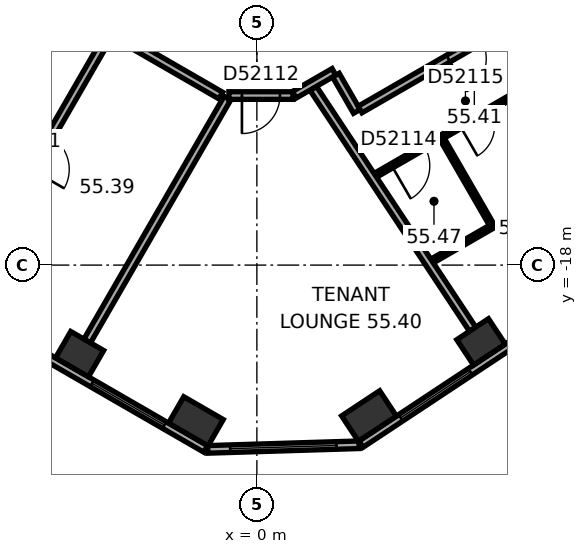
"""IFC4 building model, lengths in metres.
Left out: names, types, materials, properties, quantities, classifications, styles, units other than length and angle.
Written with IfcOpenShell. Run it as: python <this file> out.ifc"""

import sys

from ifc_helpers import new_model, si_unit, direction, frame, frame_2d, origin, origin_2d, place, context, subcontext, project, spatial, rectangle, extrude, element, fill, save


model = new_model("IFC4")
c1 = context("Model", 3, precision=1e-05, world=origin(), true_north=direction((0.0, 1.0)))
c2 = subcontext(c1, "Body", "Model", "MODEL_VIEW")
j1 = project(units=[si_unit("LENGTHUNIT", "METRE"), si_unit("PLANEANGLEUNIT", "RADIAN")], contexts=[c1])
p1 = place(None, origin())
s1 = spatial("IfcSite", under=j1, at=p1, CompositionType="ELEMENT")
p2 = place(p1, origin())
s2 = spatial("IfcBuilding", under=s1, at=p2, CompositionType="ELEMENT")
p3 = place(p2, frame((0.0, 0.0, 225.4)))
s3 = spatial("IfcBuildingStorey", under=s2, at=p3, CompositionType="ELEMENT", Elevation=225.4)
p4 = place(p3, frame((-4.665, -20.343, 0.0), z_axis=(0.0, 0.0, 1.0), x_axis=(0.866025403784, -0.5, 0.0)))
e1 = element("IfcColumn", 1, at=p4, inside=s3, PredefinedType="COLUMN", context=c2, shape_type="SweptSolid", body=[
    extrude(rectangle(XDim=1.0, YDim=0.8, at=origin_2d()), origin(), (0.0, 0.0, 1.0), 3.7),
])
for number, where, z_axis, x_axis in (
    (2, (-1.604, -22.11, 0.0), (0.0, 0.0, 1.0), (0.866, -0.5, 0.0)),
    (3, (2.951, -21.971, 0.0), (0.0, 0.0, 1.0), (0.834, 0.552, 0.0)),
):
    element("IfcColumn", number, at=place(p3, frame(where, z_axis=z_axis, x_axis=x_axis)), inside=s3, PredefinedType="COLUMN", context=c2, shape_type="SweptSolid", body=[
        extrude(rectangle(XDim=1.2, YDim=0.8, at=origin_2d()), origin(), (0.0, 0.0, 1.0), 3.7),
    ])
p5 = place(p3, frame((5.898, -20.021, 0.0), z_axis=(0.0, 0.0, 1.0), x_axis=(0.833885822067, 0.551936985312, 0.0)))
e4 = element("IfcColumn", 4, at=p5, inside=s3, PredefinedType="COLUMN", context=c2, shape_type="SweptSolid", body=[
    extrude(rectangle(XDim=1.0, YDim=0.8, at=origin_2d()), origin(), (0.0, 0.0, 1.0), 3.7),
])
p6 = place(p3, frame((-17.664, -13.415, 0.0), z_axis=(0.0, 0.0, 1.0), x_axis=(0.866026555358, -0.49999800541, 0.0)))
e5 = element("IfcWall", 5, at=p6, inside=s3, PredefinedType="STANDARD", context=c2, shape_type="SweptSolid", body=[
    extrude(rectangle(XDim=18.841, YDim=0.2, at=frame_2d((9.421, 0.0))), origin(), (0.0, 0.0, 1.0), 3.7),
])
p7 = place(p6, frame((1.254, 0.0, 0.9)))
e6 = element("IfcOpeningElement", 6, at=p7, cuts=e5, PredefinedType="OPENING", context=c2, shape_type="SweptSolid", body=[
    extrude(rectangle(XDim=2.2, YDim=2.0, at=frame_2d((1.1, 1.0))), frame((0.0, 0.11, 0.0), z_axis=(0.0, -1.0, 0.0), x_axis=(1.0, 0.0, 0.0)), (0.0, 0.0, 1.0), 0.22),
])
p8 = place(p6, frame((4.788, 0.0, 0.9)))
e7 = element("IfcOpeningElement", 7, at=p8, cuts=e5, PredefinedType="OPENING", context=c2, shape_type="SweptSolid", body=[
    extrude(rectangle(XDim=2.2, YDim=2.0, at=frame_2d((1.1, 1.0))), frame((0.0, 0.11, 0.0), z_axis=(0.0, -1.0, 0.0), x_axis=(1.0, 0.0, 0.0)), (0.0, 0.0, 1.0), 0.22),
])
p9 = place(p6, frame((8.322, 0.0, 0.9)))
e8 = element("IfcOpeningElement", 8, at=p9, cuts=e5, PredefinedType="OPENING", context=c2, shape_type="SweptSolid", body=[
    extrude(rectangle(XDim=2.2, YDim=2.0, at=frame_2d((1.1, 1.0))), frame((0.0, 0.11, 0.0), z_axis=(0.0, -1.0, 0.0), x_axis=(1.0, 0.0, 0.0)), (0.0, 0.0, 1.0), 0.22),
])
p10 = place(p6, frame((11.855, 0.0, 0.9)))
e9 = element("IfcOpeningElement", 9, at=p10, cuts=e5, PredefinedType="OPENING", context=c2, shape_type="SweptSolid", body=[
    extrude(rectangle(XDim=2.2, YDim=2.0, at=frame_2d((1.1, 1.0))), frame((0.0, 0.11, 0.0), z_axis=(0.0, -1.0, 0.0), x_axis=(1.0, 0.0, 0.0)), (0.0, 0.0, 1.0), 0.22),
])
p11 = place(p6, frame((15.389, 0.0, 0.9)))
e10 = element("IfcOpeningElement", 10, at=p11, cuts=e5, PredefinedType="OPENING", context=c2, shape_type="SweptSolid", body=[
    extrude(rectangle(XDim=2.2, YDim=2.0, at=frame_2d((1.1, 1.0))), frame((0.0, 0.11, 0.0), z_axis=(0.0, -1.0, 0.0), x_axis=(1.0, 0.0, 0.0)), (0.0, 0.0, 1.0), 0.22),
])
p12 = place(p3, frame((-1.294, -22.849, 0.0), z_axis=(0.0, 0.0, 1.0), x_axis=(0.999533952558, 0.030526671678, 0.0)))
e11 = element("IfcWall", 11, at=p12, inside=s3, PredefinedType="STANDARD", context=c2, shape_type="SweptSolid", body=[
    extrude(rectangle(XDim=3.983, YDim=0.2, at=frame_2d((1.991, 0.0))), origin(), (0.0, 0.0, 1.0), 3.7),
])
p13 = place(p12, frame((0.591, 0.0, 0.9)))
e12 = element("IfcOpeningElement", 12, at=p13, cuts=e11, PredefinedType="OPENING", context=c2, shape_type="SweptSolid", body=[
    extrude(rectangle(XDim=2.8, YDim=2.0, at=frame_2d((1.4, 1.0))), frame((0.0, 0.11, 0.0), z_axis=(0.0, -1.0, 0.0), x_axis=(1.0, 0.0, 0.0)), (0.0, 0.0, 1.0), 0.22),
])
p14 = place(p3, frame((2.739, -22.711, 0.0), z_axis=(0.0, 0.0, 1.0), x_axis=(0.833885723098, 0.551937134838, 0.0)))
e13 = element("IfcWall", 13, at=p14, inside=s3, PredefinedType="STANDARD", context=c2, shape_type="SweptSolid", body=[
    extrude(rectangle(XDim=18.841, YDim=0.2, at=frame_2d((9.421, 0.0))), origin(), (0.0, 0.0, 1.0), 3.7),
])
p15 = place(p14, frame((1.252, 0.0, 0.9)))
e14 = element("IfcOpeningElement", 14, at=p15, cuts=e13, PredefinedType="OPENING", context=c2, shape_type="SweptSolid", body=[
    extrude(rectangle(XDim=2.2, YDim=2.0, at=frame_2d((1.1, 1.0))), frame((0.0, 0.11, 0.0), z_axis=(0.0, -1.0, 0.0), x_axis=(1.0, 0.0, 0.0)), (0.0, 0.0, 1.0), 0.22),
])
p16 = place(p14, frame((4.786, 0.0, 0.9)))
e15 = element("IfcOpeningElement", 15, at=p16, cuts=e13, PredefinedType="OPENING", context=c2, shape_type="SweptSolid", body=[
    extrude(rectangle(XDim=2.2, YDim=2.0, at=frame_2d((1.1, 1.0))), frame((0.0, 0.11, 0.0), z_axis=(0.0, -1.0, 0.0), x_axis=(1.0, 0.0, 0.0)), (0.0, 0.0, 1.0), 0.22),
])
p17 = place(p14, frame((8.32, 0.0, 0.9)))
e16 = element("IfcOpeningElement", 16, at=p17, cuts=e13, PredefinedType="OPENING", context=c2, shape_type="SweptSolid", body=[
    extrude(rectangle(XDim=2.2, YDim=2.0, at=frame_2d((1.1, 1.0))), frame((0.0, 0.11, 0.0), z_axis=(0.0, -1.0, 0.0), x_axis=(1.0, 0.0, 0.0)), (0.0, 0.0, 1.0), 0.22),
])
p18 = place(p14, frame((11.854, 0.0, 0.9)))
e17 = element("IfcOpeningElement", 17, at=p18, cuts=e13, PredefinedType="OPENING", context=c2, shape_type="SweptSolid", body=[
    extrude(rectangle(XDim=2.2, YDim=2.0, at=frame_2d((1.1, 1.0))), frame((0.0, 0.11, 0.0), z_axis=(0.0, -1.0, 0.0), x_axis=(1.0, 0.0, 0.0)), (0.0, 0.0, 1.0), 0.22),
])
p19 = place(p14, frame((15.387, 0.0, 0.9)))
e18 = element("IfcOpeningElement", 18, at=p19, cuts=e13, PredefinedType="OPENING", context=c2, shape_type="SweptSolid", body=[
    extrude(rectangle(XDim=2.2, YDim=2.0, at=frame_2d((1.1, 1.0))), frame((0.0, 0.11, 0.0), z_axis=(0.0, -1.0, 0.0), x_axis=(1.0, 0.0, 0.0)), (0.0, 0.0, 1.0), 0.22),
])
p20 = place(p3, frame((-7.525, -18.23, 0.0), z_axis=(0.0, 0.0, 1.0), x_axis=(0.499983153418, 0.866035129944, 0.0)))
e19 = element("IfcWall", 19, at=p20, inside=s3, PredefinedType="PARTITIONING", context=c2, shape_type="SweptSolid", body=[
    extrude(rectangle(XDim=7.35, YDim=0.2, at=frame_2d((3.675, 0.0))), origin(), (0.0, 0.0, 1.0), 3.42),
])
p21 = place(p20, frame((3.175, 0.0, 0.0)))
e20 = element("IfcOpeningElement", 20, at=p21, cuts=e19, PredefinedType="OPENING", context=c2, shape_type="SweptSolid", body=[
    extrude(rectangle(XDim=1.0, YDim=2.1, at=frame_2d((0.5, 1.05))), frame((0.0, 0.11, 0.0), z_axis=(0.0, -1.0, 0.0), x_axis=(1.0, 0.0, 0.0)), (0.0, 0.0, 1.0), 0.22),
])
p22 = place(p3, frame((-4.465, -19.997, 0.0), z_axis=(0.0, 0.0, 1.0), x_axis=(0.500011802906, 0.866018589266, 0.0)))
e21 = element("IfcWall", 21, at=p22, inside=s3, PredefinedType="PARTITIONING", context=c2, shape_type="SweptSolid", body=[
    extrude(rectangle(XDim=7.377, YDim=0.2, at=frame_2d((3.688, 0.0))), origin(), (0.0, 0.0, 1.0), 3.42),
])
p23 = place(p3, frame((-3.763, -11.915, 0.0), z_axis=(0.0, 0.0, 1.0), x_axis=(0.866037915695, -0.499978328108, 0.0)))
e22 = element("IfcWall", 22, at=p23, inside=s3, PredefinedType="PARTITIONING", context=c2, shape_type="SweptSolid", body=[
    extrude(rectangle(XDim=3.249, YDim=0.2, at=frame_2d((1.625, 0.0))), origin(), (0.0, 0.0, 1.0), 3.42),
])
p24 = place(p3, frame((-0.736, -13.539, 0.0), z_axis=(0.0, 0.0, 1.0), x_axis=(1.0, 0.0, 0.0)))
e23 = element("IfcWall", 23, at=p24, inside=s3, PredefinedType="PARTITIONING", context=c2, shape_type="SweptSolid", body=[
    extrude(rectangle(XDim=1.686, YDim=0.2, at=frame_2d((0.843, 0.0))), origin(), (0.0, 0.0, 1.0), 3.42),
])
p25 = place(p24, frame((0.343, 0.0, 0.0)))
e24 = element("IfcOpeningElement", 24, at=p25, cuts=e23, PredefinedType="OPENING", context=c2, shape_type="SweptSolid", body=[
    extrude(rectangle(XDim=1.0, YDim=2.1, at=frame_2d((0.5, 1.05))), frame((0.0, 0.11, 0.0), z_axis=(0.0, -1.0, 0.0), x_axis=(1.0, 0.0, 0.0)), (0.0, 0.0, 1.0), 0.22),
])
p26 = place(p3, frame((0.985, -13.519, 0.0), z_axis=(0.0, 0.0, 1.0), x_axis=(0.866054082991, 0.499950322867, 0.0)))
e25 = element("IfcWall", 25, at=p26, inside=s3, PredefinedType="PARTITIONING", context=c2, shape_type="SweptSolid", body=[
    extrude(rectangle(XDim=1.206, YDim=0.2, at=frame_2d((0.603, 0.0))), origin(), (0.0, 0.0, 1.0), 3.42),
])
p27 = place(p3, frame((2.079, -13.003, 0.0), z_axis=(0.0, 0.0, 1.0), x_axis=(0.500074377092, -0.865982457891, 0.0)))
e26 = element("IfcWall", 26, at=p27, inside=s3, PredefinedType="PARTITIONING", context=c2, shape_type="SweptSolid", body=[
    extrude(rectangle(XDim=1.101, YDim=0.2, at=frame_2d((0.55, 0.0))), origin(), (0.0, 0.0, 1.0), 3.42),
])
p28 = place(p3, frame((2.716, -13.906, 0.0), z_axis=(0.0, 0.0, 1.0), x_axis=(0.866040290674, 0.499974214264, 0.0)))
e27 = element("IfcWall", 27, at=p28, inside=s3, PredefinedType="PARTITIONING", context=c2, shape_type="SweptSolid", body=[
    extrude(rectangle(XDim=8.702, YDim=0.2, at=frame_2d((4.351, 0.0))), origin(), (0.0, 0.0, 1.0), 3.42),
])
p29 = place(p28, frame((2.679, 0.0, 0.0)))
e28 = element("IfcOpeningElement", 28, at=p29, cuts=e27, PredefinedType="OPENING", context=c2, shape_type="SweptSolid", body=[
    extrude(rectangle(XDim=1.0, YDim=2.1, at=frame_2d((0.5, 1.05))), frame((0.0, 0.11, 0.0), z_axis=(0.0, -1.0, 0.0), x_axis=(1.0, 0.0, 0.0)), (0.0, 0.0, 1.0), 0.22),
])
p30 = place(p3, frame((3.117, -15.638, 0.0), z_axis=(0.0, 0.0, 1.0), x_axis=(0.866031365477, 0.499989673903, 0.0)))
e29 = element("IfcWall", 29, at=p30, inside=s3, PredefinedType="PARTITIONING", context=c2, shape_type="SweptSolid", body=[
    extrude(rectangle(XDim=6.881, YDim=0.12, at=frame_2d((3.44, 0.0))), origin(), (0.0, 0.0, 1.0), 3.42),
])
p31 = place(p30, frame((0.5, 0.0, 0.0)))
e30 = element("IfcOpeningElement", 30, at=p31, cuts=e29, PredefinedType="OPENING", context=c2, shape_type="SweptSolid", body=[
    extrude(rectangle(XDim=1.0, YDim=2.1, at=frame_2d((0.5, 1.05))), frame((0.0, 0.07, 0.0), z_axis=(0.0, -1.0, 0.0), x_axis=(1.0, 0.0, 0.0)), (0.0, 0.0, 1.0), 0.14),
])
p32 = place(p30, frame((2.583, 0.0, 0.0)))
e31 = element("IfcOpeningElement", 31, at=p32, cuts=e29, PredefinedType="OPENING", context=c2, shape_type="SweptSolid", body=[
    extrude(rectangle(XDim=0.9, YDim=2.1, at=frame_2d((0.45, 1.05))), frame((0.0, 0.07, 0.0), z_axis=(0.0, -1.0, 0.0), x_axis=(1.0, 0.0, 0.0)), (0.0, 0.0, 1.0), 0.14),
])
p33 = place(p30, frame((5.023, 0.0, 0.0)))
e32 = element("IfcOpeningElement", 32, at=p33, cuts=e29, PredefinedType="OPENING", context=c2, shape_type="SweptSolid", body=[
    extrude(rectangle(XDim=0.9, YDim=2.1, at=frame_2d((0.45, 1.05))), frame((0.0, 0.07, 0.0), z_axis=(0.0, -1.0, 0.0), x_axis=(1.0, 0.0, 0.0)), (0.0, 0.0, 1.0), 0.14),
])
p34 = place(p3, frame((4.61, -17.893, 0.0), z_axis=(0.0, 0.0, 1.0), x_axis=(0.866023842607, 0.500002704028, 0.0)))
e33 = element("IfcWall", 33, at=p34, inside=s3, PredefinedType="PARTITIONING", context=c2, shape_type="SweptSolid", body=[
    extrude(rectangle(XDim=1.835, YDim=0.12, at=frame_2d((0.917, 0.0))), origin(), (0.0, 0.0, 1.0), 3.42),
])
p35 = place(p3, frame((5.677, -19.687, 0.0), z_axis=(0.0, 0.0, 1.0), x_axis=(-0.551936619203, 0.833886064389, 0.0)))
e34 = element("IfcWall", 34, at=p35, inside=s3, PredefinedType="PARTITIONING", context=c2, shape_type="SweptSolid", body=[
    extrude(rectangle(XDim=7.592, YDim=0.2, at=frame_2d((3.796, 0.0))), origin(), (0.0, 0.0, 1.0), 3.42),
])
p36 = place(p3, frame((6.169, -16.924, 0.0), z_axis=(0.0, 0.0, 1.0), x_axis=(-0.500047388771, 0.865998042136, 0.0)))
e35 = element("IfcWall", 35, at=p36, inside=s3, PredefinedType="PARTITIONING", context=c2, shape_type="SweptSolid", body=[
    extrude(rectangle(XDim=2.58, YDim=0.12, at=frame_2d((1.29, 0.0))), origin(), (0.0, 0.0, 1.0), 3.42),
])
p37 = place(p11, origin())
e36 = element("IfcWindow", 36, at=p37, inside=s3, PartitioningType="SINGLE_PANEL", PredefinedType="WINDOW", context=c2, shape_type="SweptSolid", body=[
    extrude(rectangle(XDim=2.2, YDim=2.0, at=frame_2d((1.1, 1.0))), frame((0.0, 0.03, 0.0), z_axis=(0.0, -1.0, 0.0), x_axis=(1.0, 0.0, 0.0)), (0.0, 0.0, 1.0), 0.06),
])
fill(e10, e36)
p38 = place(p13, origin())
e37 = element("IfcWindow", 37, at=p38, inside=s3, PartitioningType="SINGLE_PANEL", PredefinedType="WINDOW", context=c2, shape_type="SweptSolid", body=[
    extrude(rectangle(XDim=2.8, YDim=2.0, at=frame_2d((1.4, 1.0))), frame((0.0, 0.03, 0.0), z_axis=(0.0, -1.0, 0.0), x_axis=(1.0, 0.0, 0.0)), (0.0, 0.0, 1.0), 0.06),
])
fill(e12, e37)
p39 = place(p15, origin())
e38 = element("IfcWindow", 38, at=p39, inside=s3, PartitioningType="SINGLE_PANEL", PredefinedType="WINDOW", context=c2, shape_type="SweptSolid", body=[
    extrude(rectangle(XDim=2.2, YDim=2.0, at=frame_2d((1.1, 1.0))), frame((0.0, 0.03, 0.0), z_axis=(0.0, -1.0, 0.0), x_axis=(1.0, 0.0, 0.0)), (0.0, 0.0, 1.0), 0.06),
])
fill(e14, e38)
p40 = place(p25, origin())
e39 = element("IfcDoor", 39, at=p40, inside=s3, OperationType="SINGLE_SWING_LEFT", PredefinedType="DOOR", context=c2, shape_type="SweptSolid", body=[
    extrude(rectangle(XDim=1.0, YDim=2.1, at=frame_2d((0.5, 1.05))), frame((0.0, 0.025, 0.0), z_axis=(0.0, -1.0, 0.0), x_axis=(1.0, 0.0, 0.0)), (0.0, 0.0, 1.0), 0.05),
])
fill(e24, e39)
p41 = place(p29, origin())
e40 = element("IfcDoor", 40, at=p41, inside=s3, OperationType="SINGLE_SWING_LEFT", PredefinedType="DOOR", context=c2, shape_type="SweptSolid", body=[
    extrude(rectangle(XDim=1.0, YDim=2.1, at=frame_2d((0.5, 1.05))), frame((0.0, 0.025, 0.0), z_axis=(0.0, -1.0, 0.0), x_axis=(1.0, 0.0, 0.0)), (0.0, 0.0, 1.0), 0.05),
])
fill(e28, e40)
p42 = place(p31, origin())
e41 = element("IfcDoor", 41, at=p42, inside=s3, OperationType="SINGLE_SWING_LEFT", PredefinedType="DOOR", context=c2, shape_type="SweptSolid", body=[
    extrude(rectangle(XDim=1.0, YDim=2.1, at=frame_2d((0.5, 1.05))), frame((0.0, 0.025, 0.0), z_axis=(0.0, -1.0, 0.0), x_axis=(1.0, 0.0, 0.0)), (0.0, 0.0, 1.0), 0.05),
])
fill(e30, e41)
p43 = place(p32, origin())
e42 = element("IfcDoor", 42, at=p43, inside=s3, OperationType="SINGLE_SWING_LEFT", PredefinedType="DOOR", context=c2, shape_type="SweptSolid", body=[
    extrude(rectangle(XDim=0.9, YDim=2.1, at=frame_2d((0.45, 1.05))), frame((0.0, 0.025, 0.0), z_axis=(0.0, -1.0, 0.0), x_axis=(1.0, 0.0, 0.0)), (0.0, 0.0, 1.0), 0.05),
])
fill(e31, e42)
save(model, sys.argv[1])
